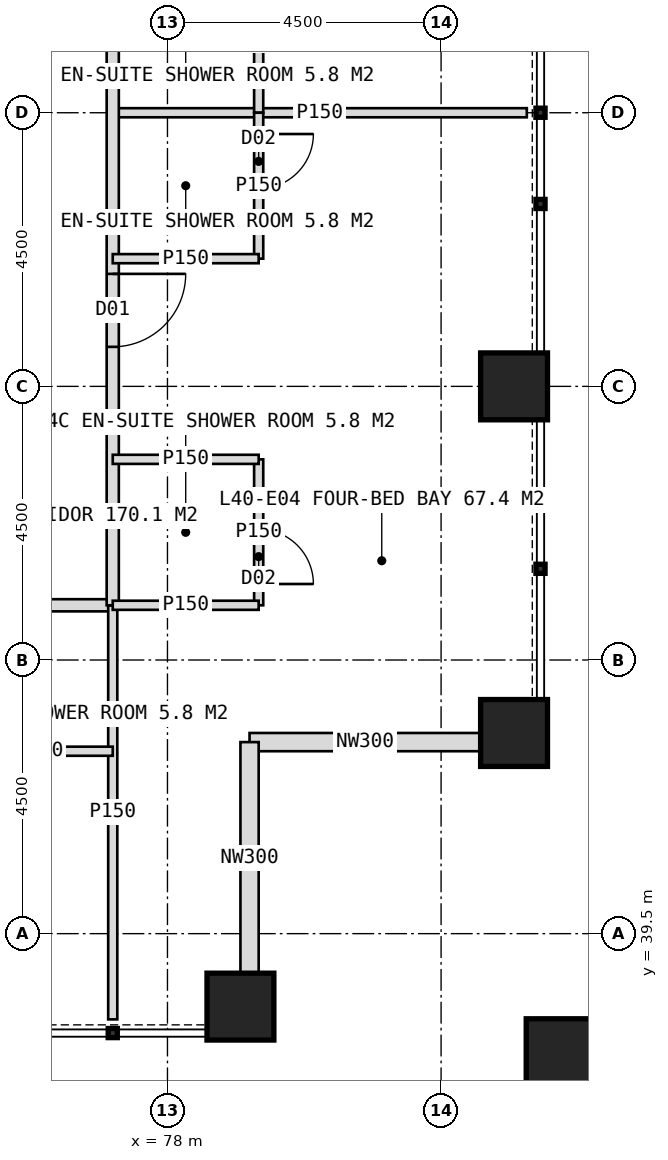
"""IFC4 building model, lengths in metres.
Left out: names, types, materials, properties, quantities, classifications, styles, units other than length and angle.
Written with IfcOpenShell. Run it as: python <this file> out.ifc"""

import sys

from ifc_helpers import new_model, si_unit, direction, frame, frame_2d, origin, origin_2d, place, context, subcontext, project, spatial, rectangle, hollow_rectangle, extrude, element, fill, save


model = new_model("IFC4")
c1 = context("Model", 3, precision=1e-05, world=origin(), true_north=direction((0.0, 1.0)))
c2 = subcontext(c1, "Body", "Model", "MODEL_VIEW")
j1 = project(units=[si_unit("LENGTHUNIT", "METRE"), si_unit("PLANEANGLEUNIT", "RADIAN")], contexts=[c1])
p1 = place(None, origin())
s1 = spatial("IfcSite", under=j1, at=p1, CompositionType="ELEMENT")
p2 = place(p1, origin())
s2 = spatial("IfcBuilding", under=s1, at=p2, CompositionType="ELEMENT")
p3 = place(p2, frame((0.0, 0.0, 168.0)))
s3 = spatial("IfcBuildingStorey", under=s2, at=p3, CompositionType="ELEMENT", Elevation=168.0)
for number, where, z_axis, x_axis in (
    (1, (83.7, 42.8, 0.0), (0.0, 0.0, 1.0), (1.0, 0.0, 0.0)),
    (2, (83.7, 48.5, 0.0), (0.0, 0.0, 1.0), (1.0, 0.0, 0.0)),
    (3, (79.2, 38.3, 0.0), (0.0, 0.0, 1.0), (1.0, 0.0, 0.0)),
):
    element("IfcColumn", number, at=place(p3, frame(where, z_axis=z_axis, x_axis=x_axis)), inside=s3, PredefinedType="COLUMN", context=c2, shape_type="SweptSolid", body=[
        extrude(hollow_rectangle(XDim=1.1, YDim=1.1, WallThickness=0.1, at=origin_2d()), origin(), (0.0, 0.0, 1.0), 4.0),
    ])
p4 = place(p3, frame((84.6, 37.4, 0.0), z_axis=(0.0, 0.0, 1.0), x_axis=(1.0, 0.0, 0.0)))
e4 = element("IfcColumn", 4, at=p4, inside=s3, PredefinedType="COLUMN", context=c2, shape_type="SweptSolid", body=[
    extrude(hollow_rectangle(XDim=1.4, YDim=1.4, WallThickness=0.08, at=origin_2d()), origin(), (0.0, 0.0, 1.0), 2.0),
])
for number, where, z_axis, x_axis in (
    (5, (83.15, 42.65, 0.0), (0.0, 0.0, 1.0), (-1.0, 0.0, 0.0)),
    (6, (79.35, 42.65, 0.0), (0.0, 0.0, 1.0), (0.0, -1.0, 0.0)),
):
    element("IfcWall", number, at=place(p3, frame(where, z_axis=z_axis, x_axis=x_axis)), inside=s3, PredefinedType="ELEMENTEDWALL", context=c2, shape_type="SweptSolid", body=[
        extrude(rectangle(XDim=3.8, YDim=0.3, at=frame_2d((1.9, 0.0))), origin(), (0.0, 0.0, 1.0), 4.0),
    ])
p5 = place(p3, frame((77.1, 44.9, 0.0), z_axis=(0.0, 0.0, 1.0), x_axis=(-1.0, 0.0, 0.0)))
e7 = element("IfcWall", 7, at=p5, inside=s3, PredefinedType="PARTITIONING", context=c2, shape_type="SweptSolid", body=[
    extrude(rectangle(XDim=34.2, YDim=0.2, at=frame_2d((17.1, 0.0))), origin(), (0.0, 0.0, 1.0), 3.75),
])
p6 = place(p5, frame((4.25, 0.0, 0.0)))
e8 = element("IfcOpeningElement", 8, at=p6, cuts=e7, PredefinedType="OPENING", context=c2, shape_type="SweptSolid", body=[
    extrude(rectangle(XDim=1.2, YDim=2.2, at=frame_2d((0.6, 1.1))), frame((0.0, 0.11, 0.0), z_axis=(0.0, -1.0, 0.0), x_axis=(1.0, 0.0, 0.0)), (0.0, 0.0, 1.0), 0.22),
])
p7 = place(p5, frame((10.75, 0.0, 0.0)))
e9 = element("IfcOpeningElement", 9, at=p7, cuts=e7, PredefinedType="OPENING", context=c2, shape_type="SweptSolid", body=[
    extrude(rectangle(XDim=1.2, YDim=2.2, at=frame_2d((0.6, 1.1))), frame((0.0, 0.11, 0.0), z_axis=(0.0, -1.0, 0.0), x_axis=(1.0, 0.0, 0.0)), (0.0, 0.0, 1.0), 0.22),
])
p8 = place(p5, frame((22.25, 0.0, 0.0)))
e10 = element("IfcOpeningElement", 10, at=p8, cuts=e7, PredefinedType="OPENING", context=c2, shape_type="SweptSolid", body=[
    extrude(rectangle(XDim=1.2, YDim=2.2, at=frame_2d((0.6, 1.1))), frame((0.0, 0.11, 0.0), z_axis=(0.0, -1.0, 0.0), x_axis=(1.0, 0.0, 0.0)), (0.0, 0.0, 1.0), 0.22),
])
p9 = place(p5, frame((28.75, 0.0, 0.0)))
e11 = element("IfcOpeningElement", 11, at=p9, cuts=e7, PredefinedType="OPENING", context=c2, shape_type="SweptSolid", body=[
    extrude(rectangle(XDim=1.2, YDim=2.2, at=frame_2d((0.6, 1.1))), frame((0.0, 0.11, 0.0), z_axis=(0.0, -1.0, 0.0), x_axis=(1.0, 0.0, 0.0)), (0.0, 0.0, 1.0), 0.22),
])
p10 = place(p3, frame((77.1, 44.9, 0.0), z_axis=(0.0, 0.0, 1.0), x_axis=(0.0, -1.0, 0.0)))
e12 = element("IfcWall", 12, at=p10, inside=s3, PredefinedType="PARTITIONING", context=c2, shape_type="SweptSolid", body=[
    extrude(rectangle(XDim=6.81, YDim=0.15, at=frame_2d((3.405, 0.0))), origin(), (0.0, 0.0, 1.0), 3.75),
])
p11 = place(p3, frame((77.1, 42.5, 0.0), z_axis=(0.0, 0.0, 1.0), x_axis=(-1.0, 0.0, 0.0)))
e13 = element("IfcWall", 13, at=p11, inside=s3, PredefinedType="PARTITIONING", context=c2, shape_type="SweptSolid", body=[
    extrude(rectangle(XDim=2.4, YDim=0.15, at=frame_2d((1.2, 0.0))), origin(), (0.0, 0.0, 1.0), 3.75),
])
p12 = place(p11, frame((1.15, 0.0, 0.0)))
e14 = element("IfcOpeningElement", 14, at=p12, cuts=e13, PredefinedType="OPENING", context=c2, shape_type="SweptSolid", body=[
    extrude(rectangle(XDim=0.9, YDim=2.1, at=frame_2d((0.45, 1.05))), frame((0.0, 0.085, 0.0), z_axis=(0.0, -1.0, 0.0), x_axis=(1.0, 0.0, 0.0)), (0.0, 0.0, 1.0), 0.17),
])
p13 = place(p3, frame((77.1, 53.0, 0.0), z_axis=(0.0, 0.0, 1.0), x_axis=(1.0, 0.0, 0.0)))
e15 = element("IfcWall", 15, at=p13, inside=s3, PredefinedType="PARTITIONING", context=c2, shape_type="SweptSolid", body=[
    extrude(rectangle(XDim=6.81, YDim=0.15, at=frame_2d((3.405, 0.0))), origin(), (0.0, 0.0, 1.0), 3.75),
])
p14 = place(p3, frame((77.1, 79.1, 0.0), z_axis=(0.0, 0.0, 1.0), x_axis=(0.0, -1.0, 0.0)))
e16 = element("IfcWall", 16, at=p14, inside=s3, PredefinedType="PARTITIONING", context=c2, shape_type="SweptSolid", body=[
    extrude(rectangle(XDim=34.2, YDim=0.2, at=frame_2d((17.1, 0.0))), origin(), (0.0, 0.0, 1.0), 3.75),
])
p15 = place(p14, frame((3.65, 0.0, 0.0)))
e17 = element("IfcOpeningElement", 17, at=p15, cuts=e16, PredefinedType="OPENING", context=c2, shape_type="SweptSolid", body=[
    extrude(rectangle(XDim=1.2, YDim=2.2, at=frame_2d((0.6, 1.1))), frame((0.0, 0.11, 0.0), z_axis=(0.0, -1.0, 0.0), x_axis=(1.0, 0.0, 0.0)), (0.0, 0.0, 1.0), 0.22),
])
p16 = place(p14, frame((10.75, 0.0, 0.0)))
e18 = element("IfcOpeningElement", 18, at=p16, cuts=e16, PredefinedType="OPENING", context=c2, shape_type="SweptSolid", body=[
    extrude(rectangle(XDim=1.2, YDim=2.2, at=frame_2d((0.6, 1.1))), frame((0.0, 0.11, 0.0), z_axis=(0.0, -1.0, 0.0), x_axis=(1.0, 0.0, 0.0)), (0.0, 0.0, 1.0), 0.22),
])
p17 = place(p14, frame((22.25, 0.0, 0.0)))
e19 = element("IfcOpeningElement", 19, at=p17, cuts=e16, PredefinedType="OPENING", context=c2, shape_type="SweptSolid", body=[
    extrude(rectangle(XDim=1.2, YDim=2.2, at=frame_2d((0.6, 1.1))), frame((0.0, 0.11, 0.0), z_axis=(0.0, -1.0, 0.0), x_axis=(1.0, 0.0, 0.0)), (0.0, 0.0, 1.0), 0.22),
])
p18 = place(p14, frame((28.75, 0.0, 0.0)))
e20 = element("IfcOpeningElement", 20, at=p18, cuts=e16, PredefinedType="OPENING", context=c2, shape_type="SweptSolid", body=[
    extrude(rectangle(XDim=1.2, YDim=2.2, at=frame_2d((0.6, 1.1))), frame((0.0, 0.11, 0.0), z_axis=(0.0, -1.0, 0.0), x_axis=(1.0, 0.0, 0.0)), (0.0, 0.0, 1.0), 0.22),
])
p19 = place(p3, frame((79.5, 55.4, 0.0), z_axis=(0.0, 0.0, 1.0), x_axis=(0.0, -1.0, 0.0)))
e21 = element("IfcWall", 21, at=p19, inside=s3, PredefinedType="PARTITIONING", context=c2, shape_type="SweptSolid", body=[
    extrude(rectangle(XDim=2.4, YDim=0.15, at=frame_2d((1.2, 0.0))), origin(), (0.0, 0.0, 1.0), 3.75),
])
p20 = place(p19, frame((0.35, 0.0, 0.0)))
e22 = element("IfcOpeningElement", 22, at=p20, cuts=e21, PredefinedType="OPENING", context=c2, shape_type="SweptSolid", body=[
    extrude(rectangle(XDim=0.9, YDim=2.1, at=frame_2d((0.45, 1.05))), frame((0.0, 0.085, 0.0), z_axis=(0.0, -1.0, 0.0), x_axis=(1.0, 0.0, 0.0)), (0.0, 0.0, 1.0), 0.17),
])
p21 = place(p3, frame((79.5, 53.0, 0.0), z_axis=(0.0, 0.0, 1.0), x_axis=(0.0, -1.0, 0.0)))
e23 = element("IfcWall", 23, at=p21, inside=s3, PredefinedType="PARTITIONING", context=c2, shape_type="SweptSolid", body=[
    extrude(rectangle(XDim=2.4, YDim=0.15, at=frame_2d((1.2, 0.0))), origin(), (0.0, 0.0, 1.0), 3.75),
])
p22 = place(p21, frame((0.35, 0.0, 0.0)))
e24 = element("IfcOpeningElement", 24, at=p22, cuts=e23, PredefinedType="OPENING", context=c2, shape_type="SweptSolid", body=[
    extrude(rectangle(XDim=0.9, YDim=2.1, at=frame_2d((0.45, 1.05))), frame((0.0, 0.085, 0.0), z_axis=(0.0, -1.0, 0.0), x_axis=(1.0, 0.0, 0.0)), (0.0, 0.0, 1.0), 0.17),
])
p23 = place(p3, frame((77.1, 50.6, 0.0), z_axis=(0.0, 0.0, 1.0), x_axis=(1.0, 0.0, 0.0)))
e25 = element("IfcWall", 25, at=p23, inside=s3, PredefinedType="PARTITIONING", context=c2, shape_type="SweptSolid", body=[
    extrude(rectangle(XDim=2.4, YDim=0.15, at=frame_2d((1.2, 0.0))), origin(), (0.0, 0.0, 1.0), 3.75),
])
p24 = place(p3, frame((79.5, 47.3, 0.0), z_axis=(0.0, 0.0, 1.0), x_axis=(0.0, -1.0, 0.0)))
e26 = element("IfcWall", 26, at=p24, inside=s3, PredefinedType="PARTITIONING", context=c2, shape_type="SweptSolid", body=[
    extrude(rectangle(XDim=2.4, YDim=0.15, at=frame_2d((1.2, 0.0))), origin(), (0.0, 0.0, 1.0), 3.75),
])
p25 = place(p24, frame((1.15, 0.0, 0.0)))
e27 = element("IfcOpeningElement", 27, at=p25, cuts=e26, PredefinedType="OPENING", context=c2, shape_type="SweptSolid", body=[
    extrude(rectangle(XDim=0.9, YDim=2.1, at=frame_2d((0.45, 1.05))), frame((0.0, 0.085, 0.0), z_axis=(0.0, -1.0, 0.0), x_axis=(1.0, 0.0, 0.0)), (0.0, 0.0, 1.0), 0.17),
])
for number, where, z_axis, x_axis in (
    (28, (77.1, 47.3, 0.0), (0.0, 0.0, 1.0), (1.0, 0.0, 0.0)),
    (29, (77.1, 44.9, 0.0), (0.0, 0.0, 1.0), (1.0, 0.0, 0.0)),
):
    element("IfcWall", number, at=place(p3, frame(where, z_axis=z_axis, x_axis=x_axis)), inside=s3, PredefinedType="PARTITIONING", context=c2, shape_type="SweptSolid", body=[
        extrude(rectangle(XDim=2.4, YDim=0.15, at=frame_2d((1.2, 0.0))), origin(), (0.0, 0.0, 1.0), 3.75),
    ])
p26 = place(p18, origin())
e30 = element("IfcDoor", 30, at=p26, inside=s3, OperationType="SINGLE_SWING_LEFT", PredefinedType="DOOR", context=c2, shape_type="SweptSolid", body=[
    extrude(rectangle(XDim=1.2, YDim=2.2, at=frame_2d((0.6, 1.1))), frame((0.0, 0.025, 0.0), z_axis=(0.0, -1.0, 0.0), x_axis=(1.0, 0.0, 0.0)), (0.0, 0.0, 1.0), 0.05),
])
fill(e20, e30)
p27 = place(p22, origin())
e31 = element("IfcDoor", 31, at=p27, inside=s3, OperationType="SINGLE_SWING_LEFT", PredefinedType="DOOR", context=c2, shape_type="SweptSolid", body=[
    extrude(rectangle(XDim=0.9, YDim=2.1, at=frame_2d((0.45, 1.05))), frame((0.0, 0.025, 0.0), z_axis=(0.0, -1.0, 0.0), x_axis=(1.0, 0.0, 0.0)), (0.0, 0.0, 1.0), 0.05),
])
fill(e24, e31)
p28 = place(p25, origin())
e32 = element("IfcDoor", 32, at=p28, inside=s3, OperationType="SINGLE_SWING_RIGHT", PredefinedType="DOOR", context=c2, shape_type="SweptSolid", body=[
    extrude(rectangle(XDim=0.9, YDim=2.1, at=frame_2d((0.45, 1.05))), frame((0.0, 0.025, 0.0), z_axis=(0.0, -1.0, 0.0), x_axis=(1.0, 0.0, 0.0)), (0.0, 0.0, 1.0), 0.05),
])
fill(e27, e32)
save(model, sys.argv[1])
